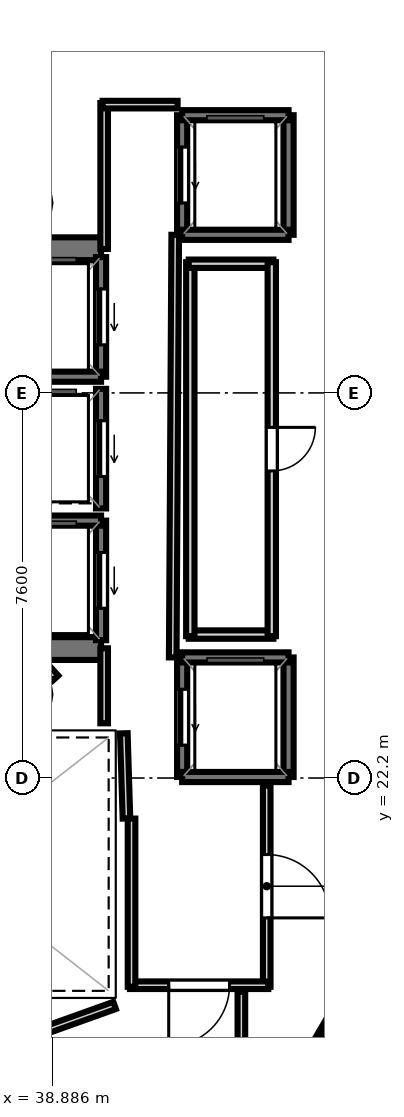
"""IFC4 building model, lengths in metres.
Left out: names, types, materials, properties, quantities, classifications, styles, units other than length and angle.
Written with IfcOpenShell. Run it as: python <this file> out.ifc"""

import sys

from ifc_helpers import new_model, si_unit, direction, frame, frame_2d, origin, place, context, subcontext, project, spatial, rectangle, extrude, element, fill, save


model = new_model("IFC4")
c1 = context("Model", 3, precision=1e-05, world=origin(), true_north=direction((0.0, 1.0)))
c2 = subcontext(c1, "Body", "Model", "MODEL_VIEW")
j1 = project(units=[si_unit("LENGTHUNIT", "METRE"), si_unit("PLANEANGLEUNIT", "RADIAN")], contexts=[c1])
p1 = place(None, origin())
s1 = spatial("IfcSite", under=j1, at=p1, CompositionType="ELEMENT")
p2 = place(p1, origin())
s2 = spatial("IfcBuilding", under=s1, at=p2, CompositionType="ELEMENT")
p3 = place(p2, frame((0.0, 0.0, 299.1)))
s3 = spatial("IfcBuildingStorey", under=s2, at=p3, CompositionType="ELEMENT", Elevation=299.1)
p4 = place(p3, frame((29.33, 32.645, 0.0), z_axis=(0.0, 0.0, 1.0), x_axis=(1.0, 0.0, 0.0)))
e1 = element("IfcWall", 1, at=p4, inside=s3, PredefinedType="SHEAR", context=c2, shape_type="SweptSolid", body=[
    extrude(rectangle(XDim=10.52, YDim=0.45, at=frame_2d((5.26, 0.0))), origin(), (0.0, 0.0, 1.0), 3.52),
])
p5 = place(p4, frame((0.895, 0.0, 0.0)))
e2 = element("IfcOpeningElement", 2, at=p5, cuts=e1, PredefinedType="OPENING", context=c2, shape_type="SweptSolid", body=[
    extrude(rectangle(XDim=1.25, YDim=2.15, at=frame_2d((0.625, 1.075))), frame((0.0, 0.235, 0.0), z_axis=(0.0, -1.0, 0.0), x_axis=(1.0, 0.0, 0.0)), (0.0, 0.0, 1.0), 0.47),
])
p6 = place(p3, frame((29.33, 24.755, 0.0), z_axis=(0.0, 0.0, 1.0), x_axis=(1.0, 0.0, 0.0)))
e3 = element("IfcWall", 3, at=p6, inside=s3, PredefinedType="SHEAR", context=c2, shape_type="SweptSolid", body=[
    extrude(rectangle(XDim=10.52, YDim=0.45, at=frame_2d((5.26, 0.0))), origin(), (0.0, 0.0, 1.0), 3.52),
])
p7 = place(p6, frame((0.695, 0.0, 0.0)))
e4 = element("IfcOpeningElement", 4, at=p7, cuts=e3, PredefinedType="OPENING", context=c2, shape_type="SweptSolid", body=[
    extrude(rectangle(XDim=1.25, YDim=2.15, at=frame_2d((0.625, 1.075))), frame((0.0, 0.235, 0.0), z_axis=(0.0, -1.0, 0.0), x_axis=(1.0, 0.0, 0.0)), (0.0, 0.0, 1.0), 0.47),
])
p8 = place(p3, frame((39.85, 30.12, 0.0), z_axis=(0.0, 0.0, 1.0), x_axis=(0.0, 1.0, 0.0)))
e5 = element("IfcWall", 5, at=p8, inside=s3, PredefinedType="SOLIDWALL", context=c2, shape_type="SweptSolid", body=[
    extrude(rectangle(XDim=2.36, YDim=0.2, at=frame_2d((1.18, 0.0))), origin(), (0.0, 0.0, 1.0), 3.52),
])
p9 = place(p8, frame((0.63, 0.0, 0.0)))
e6 = element("IfcOpeningElement", 6, at=p9, cuts=e5, PredefinedType="OPENING", context=c2, shape_type="SweptSolid", body=[
    extrude(rectangle(XDim=1.1, YDim=2.15, at=frame_2d((0.55, 1.075))), frame((0.0, 0.11, 0.0), z_axis=(0.0, -1.0, 0.0), x_axis=(1.0, 0.0, 0.0)), (0.0, 0.0, 1.0), 0.22),
])
p10 = place(p3, frame((37.75, 30.12, 0.0), z_axis=(0.0, 0.0, 1.0), x_axis=(1.0, 0.0, 0.0)))
e7 = element("IfcWall", 7, at=p10, inside=s3, PredefinedType="SOLIDWALL", context=c2, shape_type="SweptSolid", body=[
    extrude(rectangle(XDim=2.1, YDim=0.2, at=frame_2d((1.05, 0.0))), origin(), (0.0, 0.0, 1.0), 3.52),
])
p11 = place(p3, frame((39.85, 24.92, 0.0), z_axis=(0.0, 0.0, 1.0), x_axis=(0.0, 1.0, 0.0)))
e8 = element("IfcWall", 8, at=p11, inside=s3, PredefinedType="SOLIDWALL", context=c2, shape_type="SweptSolid", body=[
    extrude(rectangle(XDim=2.36, YDim=0.2, at=frame_2d((1.18, 0.0))), origin(), (0.0, 0.0, 1.0), 3.52),
])
p12 = place(p11, frame((0.63, 0.0, 0.0)))
e9 = element("IfcOpeningElement", 9, at=p12, cuts=e8, PredefinedType="OPENING", context=c2, shape_type="SweptSolid", body=[
    extrude(rectangle(XDim=1.1, YDim=2.15, at=frame_2d((0.55, 1.075))), frame((0.0, 0.11, 0.0), z_axis=(0.0, -1.0, 0.0), x_axis=(1.0, 0.0, 0.0)), (0.0, 0.0, 1.0), 0.22),
])
p13 = place(p3, frame((37.75, 27.28, 0.0), z_axis=(0.0, 0.0, 1.0), x_axis=(1.0, 0.0, 0.0)))
e10 = element("IfcWall", 10, at=p13, inside=s3, PredefinedType="SOLIDWALL", context=c2, shape_type="SweptSolid", body=[
    extrude(rectangle(XDim=2.1, YDim=0.2, at=frame_2d((1.05, 0.0))), origin(), (0.0, 0.0, 1.0), 3.52),
])
p14 = place(p3, frame((39.85, 27.52, 0.0), z_axis=(0.0, 0.0, 1.0), x_axis=(0.0, 1.0, 0.0)))
e11 = element("IfcWall", 11, at=p14, inside=s3, PredefinedType="SOLIDWALL", context=c2, shape_type="SweptSolid", body=[
    extrude(rectangle(XDim=2.36, YDim=0.2, at=frame_2d((1.18, 0.0))), origin(), (0.0, 0.0, 1.0), 3.52),
])
p15 = place(p14, frame((0.63, 0.0, 0.0)))
e12 = element("IfcOpeningElement", 12, at=p15, cuts=e11, PredefinedType="OPENING", context=c2, shape_type="SweptSolid", body=[
    extrude(rectangle(XDim=1.1, YDim=2.15, at=frame_2d((0.55, 1.075))), frame((0.0, 0.11, 0.0), z_axis=(0.0, -1.0, 0.0), x_axis=(1.0, 0.0, 0.0)), (0.0, 0.0, 1.0), 0.22),
])
p16 = place(p3, frame((43.55, 22.22, 0.0), z_axis=(0.0, 0.0, 1.0), x_axis=(0.0, 1.0, 0.0)))
e13 = element("IfcWall", 13, at=p16, inside=s3, PredefinedType="SOLIDWALL", context=c2, shape_type="SweptSolid", body=[
    extrude(rectangle(XDim=2.36, YDim=0.2, at=frame_2d((1.18, 0.0))), origin(), (0.0, 0.0, 1.0), 3.52),
])
p17 = place(p3, frame((41.45, 22.22, 0.0), z_axis=(0.0, 0.0, 1.0), x_axis=(0.0, 1.0, 0.0)))
e14 = element("IfcWall", 14, at=p17, inside=s3, PredefinedType="SOLIDWALL", context=c2, shape_type="SweptSolid", body=[
    extrude(rectangle(XDim=2.36, YDim=0.2, at=frame_2d((1.18, 0.0))), origin(), (0.0, 0.0, 1.0), 3.52),
])
p18 = place(p17, frame((0.63, 0.0, 0.0)))
e15 = element("IfcOpeningElement", 15, at=p18, cuts=e14, PredefinedType="OPENING", context=c2, shape_type="SweptSolid", body=[
    extrude(rectangle(XDim=1.1, YDim=2.15, at=frame_2d((0.55, 1.075))), frame((0.0, 0.11, 0.0), z_axis=(0.0, -1.0, 0.0), x_axis=(1.0, 0.0, 0.0)), (0.0, 0.0, 1.0), 0.22),
])
for number, where, z_axis, x_axis in (
    (16, (41.45, 24.58, 0.0), (0.0, 0.0, 1.0), (1.0, 0.0, 0.0)),
    (17, (41.45, 22.22, 0.0), (0.0, 0.0, 1.0), (1.0, 0.0, 0.0)),
):
    element("IfcWall", number, at=place(p3, frame(where, z_axis=z_axis, x_axis=x_axis)), inside=s3, PredefinedType="SOLIDWALL", context=c2, shape_type="SweptSolid", body=[
        extrude(rectangle(XDim=2.1, YDim=0.2, at=frame_2d((1.05, 0.0))), origin(), (0.0, 0.0, 1.0), 3.52),
    ])
p19 = place(p3, frame((43.55, 32.92, 0.0), z_axis=(0.0, 0.0, 1.0), x_axis=(0.0, 1.0, 0.0)))
e18 = element("IfcWall", 18, at=p19, inside=s3, PredefinedType="SOLIDWALL", context=c2, shape_type="SweptSolid", body=[
    extrude(rectangle(XDim=2.36, YDim=0.2, at=frame_2d((1.18, 0.0))), origin(), (0.0, 0.0, 1.0), 3.52),
])
p20 = place(p3, frame((41.45, 32.92, 0.0), z_axis=(0.0, 0.0, 1.0), x_axis=(0.0, 1.0, 0.0)))
e19 = element("IfcWall", 19, at=p20, inside=s3, PredefinedType="SOLIDWALL", context=c2, shape_type="SweptSolid", body=[
    extrude(rectangle(XDim=2.36, YDim=0.2, at=frame_2d((1.18, 0.0))), origin(), (0.0, 0.0, 1.0), 3.52),
])
p21 = place(p20, frame((0.63, 0.0, 0.0)))
e20 = element("IfcOpeningElement", 20, at=p21, cuts=e19, PredefinedType="OPENING", context=c2, shape_type="SweptSolid", body=[
    extrude(rectangle(XDim=1.1, YDim=2.15, at=frame_2d((0.55, 1.075))), frame((0.0, 0.11, 0.0), z_axis=(0.0, -1.0, 0.0), x_axis=(1.0, 0.0, 0.0)), (0.0, 0.0, 1.0), 0.22),
])
for number, where, z_axis, x_axis in (
    (21, (41.45, 35.28, 0.0), (0.0, 0.0, 1.0), (1.0, 0.0, 0.0)),
    (22, (41.45, 32.92, 0.0), (0.0, 0.0, 1.0), (1.0, 0.0, 0.0)),
):
    element("IfcWall", number, at=place(p3, frame(where, z_axis=z_axis, x_axis=x_axis)), inside=s3, PredefinedType="SOLIDWALL", context=c2, shape_type="SweptSolid", body=[
        extrude(rectangle(XDim=2.1, YDim=0.2, at=frame_2d((1.05, 0.0))), origin(), (0.0, 0.0, 1.0), 3.52),
    ])
p22 = place(p3, frame((40.351, 21.401, 0.0), z_axis=(0.0, 0.0, 1.0), x_axis=(-0.031058045979, 0.999517582527, 0.0)))
e23 = element("IfcWall", 23, at=p22, inside=s3, PredefinedType="PARTITIONING", context=c2, shape_type="SweptSolid", body=[
    extrude(rectangle(XDim=1.682, YDim=0.15, at=frame_2d((0.841, 0.0))), origin(), (0.0, 0.0, 1.0), 2.84),
])
p23 = place(p3, frame((39.911, 23.28, 0.0), z_axis=(0.0, 0.0, 1.0), x_axis=(0.0, 1.0, 0.0)))
e24 = element("IfcWall", 24, at=p23, inside=s3, PredefinedType="PARTITIONING", context=c2, shape_type="SweptSolid", body=[
    extrude(rectangle(XDim=1.48, YDim=0.15, at=frame_2d((0.74, 0.0))), origin(), (0.0, 0.0, 1.0), 2.84),
])
p24 = place(p3, frame((39.911, 32.64, 0.0), z_axis=(0.0, 0.0, 1.0), x_axis=(0.0, 1.0, 0.0)))
e25 = element("IfcWall", 25, at=p24, inside=s3, PredefinedType="PARTITIONING", context=c2, shape_type="SweptSolid", body=[
    extrude(rectangle(XDim=2.88, YDim=0.15, at=frame_2d((1.44, 0.0))), origin(), (0.0, 0.0, 1.0), 2.84),
])
p25 = place(p3, frame((39.88, 35.489, 0.0), z_axis=(0.0, 0.0, 1.0), x_axis=(1.0, 0.0, 0.0)))
e26 = element("IfcWall", 26, at=p25, inside=s3, PredefinedType="PARTITIONING", context=c2, shape_type="SweptSolid", body=[
    extrude(rectangle(XDim=1.48, YDim=0.15, at=frame_2d((0.74, 0.0))), origin(), (0.0, 0.0, 1.0), 2.84),
])
p26 = place(p3, frame((41.313, 32.92, 0.0), z_axis=(0.0, 0.0, 1.0), x_axis=(-0.005942518022, -0.999982343084, 0.0)))
e27 = element("IfcWall", 27, at=p26, inside=s3, PredefinedType="PARTITIONING", context=c2, shape_type="SweptSolid", body=[
    extrude(rectangle(XDim=8.34, YDim=0.15, at=frame_2d((4.17, 0.0))), origin(), (0.0, 0.0, 1.0), 2.84),
])
p27 = place(p3, frame((43.119, 22.05, 0.0), z_axis=(0.0, 0.0, 1.0), x_axis=(0.0, -1.0, 0.0)))
e28 = element("IfcWall", 28, at=p27, inside=s3, PredefinedType="PARTITIONING", context=c2, shape_type="SweptSolid", body=[
    extrude(rectangle(XDim=3.97, YDim=0.15, at=frame_2d((1.985, 0.0))), origin(), (0.0, 0.0, 1.0), 2.84),
])
p28 = place(p27, frame((1.36, 0.0, 0.0)))
e29 = element("IfcOpeningElement", 29, at=p28, cuts=e28, PredefinedType="OPENING", context=c2, shape_type="SweptSolid", body=[
    extrude(rectangle(XDim=1.25, YDim=2.2, at=frame_2d((0.625, 1.1))), frame((0.0, 0.085, 0.0), z_axis=(0.0, -1.0, 0.0), x_axis=(1.0, 0.0, 0.0)), (0.0, 0.0, 1.0), 0.17),
])
p29 = place(p3, frame((43.15, 18.111, 0.0), z_axis=(0.0, 0.0, 1.0), x_axis=(-1.0, 0.0, 0.0)))
e30 = element("IfcWall", 30, at=p29, inside=s3, PredefinedType="PARTITIONING", context=c2, shape_type="SweptSolid", body=[
    extrude(rectangle(XDim=2.73, YDim=0.15, at=frame_2d((1.365, 0.0))), origin(), (0.0, 0.0, 1.0), 2.84),
])
p30 = place(p29, frame((0.765, 0.0, 0.0)))
e31 = element("IfcOpeningElement", 31, at=p30, cuts=e30, PredefinedType="OPENING", context=c2, shape_type="SweptSolid", body=[
    extrude(rectangle(XDim=1.2, YDim=2.15, at=frame_2d((0.6, 1.075))), frame((0.0, 0.085, 0.0), z_axis=(0.0, -1.0, 0.0), x_axis=(1.0, 0.0, 0.0)), (0.0, 0.0, 1.0), 0.17),
])
p31 = place(p3, frame((40.451, 18.08, 0.0), z_axis=(0.0, 0.0, 1.0), x_axis=(0.0, 1.0, 0.0)))
e32 = element("IfcWall", 32, at=p31, inside=s3, PredefinedType="PARTITIONING", context=c2, shape_type="SweptSolid", body=[
    extrude(rectangle(XDim=3.32, YDim=0.15, at=frame_2d((1.66, 0.0))), origin(), (0.0, 0.0, 1.0), 2.84),
])
p32 = place(p3, frame((43.25, 25.031, 0.0), z_axis=(0.0, 0.0, 1.0), x_axis=(-1.0, 0.0, 0.0)))
e33 = element("IfcWall", 33, at=p32, inside=s3, PredefinedType="PLUMBINGWALL", context=c2, shape_type="SweptSolid", body=[
    extrude(rectangle(XDim=1.67, YDim=0.165, at=frame_2d((0.835, 0.0))), origin(), (0.0, 0.0, 1.0), 2.84),
])
p33 = place(p3, frame((41.611, 25.0, 0.0), z_axis=(0.0, 0.0, 1.0), x_axis=(0.0, 1.0, 0.0)))
e34 = element("IfcWall", 34, at=p33, inside=s3, PredefinedType="PLUMBINGWALL", context=c2, shape_type="SweptSolid", body=[
    extrude(rectangle(XDim=7.38, YDim=0.165, at=frame_2d((3.69, 0.0))), origin(), (0.0, 0.0, 1.0), 2.84),
])
p34 = place(p3, frame((41.58, 32.349, 0.0), z_axis=(0.0, 0.0, 1.0), x_axis=(1.0, 0.0, 0.0)))
e35 = element("IfcWall", 35, at=p34, inside=s3, PredefinedType="PLUMBINGWALL", context=c2, shape_type="SweptSolid", body=[
    extrude(rectangle(XDim=1.67, YDim=0.165, at=frame_2d((0.835, 0.0))), origin(), (0.0, 0.0, 1.0), 2.84),
])
p35 = place(p3, frame((43.219, 32.38, 0.0), z_axis=(0.0, 0.0, 1.0), x_axis=(0.0, -1.0, 0.0)))
e36 = element("IfcWall", 36, at=p35, inside=s3, PredefinedType="PLUMBINGWALL", context=c2, shape_type="SweptSolid", body=[
    extrude(rectangle(XDim=7.38, YDim=0.165, at=frame_2d((3.69, 0.0))), origin(), (0.0, 0.0, 1.0), 2.84),
])
p36 = place(p35, frame((3.26, 0.0, 0.0)))
e37 = element("IfcOpeningElement", 37, at=p36, cuts=e36, PredefinedType="OPENING", context=c2, shape_type="SweptSolid", body=[
    extrude(rectangle(XDim=0.86, YDim=2.05, at=frame_2d((0.43, 1.025))), frame((0.0, 0.093, 0.0), z_axis=(0.0, -1.0, 0.0), x_axis=(1.0, 0.0, 0.0)), (0.0, 0.0, 1.0), 0.185),
])
p37 = place(p3, frame((38.951, 24.171, 0.0), z_axis=(0.0, 0.0, 1.0), x_axis=(-0.674186852077, 0.738560822469, 0.0)))
e38 = element("IfcWall", 38, at=p37, inside=s3, PredefinedType="PARTITIONING", context=c2, shape_type="SweptSolid", body=[
    extrude(rectangle(XDim=0.281, YDim=0.15, at=frame_2d((0.14, 0.0))), origin(), (0.0, 0.0, 1.0), 2.84),
])
p38 = place(p3, frame((36.81, 16.529, 0.0), z_axis=(0.0, 0.0, 1.0), x_axis=(0.941548344365, 0.33687789364, 0.0)))
e39 = element("IfcWall", 39, at=p38, inside=s3, PredefinedType="PARTITIONING", context=c2, shape_type="SweptSolid", body=[
    extrude(rectangle(XDim=3.513, YDim=0.15, at=frame_2d((1.756, 0.0))), origin(), (0.0, 0.0, 1.0), 2.84),
])
p39 = place(p3, frame((42.619, 17.98, 0.0), z_axis=(0.0, 0.0, 1.0), x_axis=(0.0, -1.0, 0.0)))
e40 = element("IfcWall", 40, at=p39, inside=s3, PredefinedType="PARTITIONING", context=c2, shape_type="SweptSolid", body=[
    extrude(rectangle(XDim=1.93, YDim=0.15, at=frame_2d((0.965, 0.0))), origin(), (0.0, 0.0, 1.0), 2.84),
])
p40 = place(p3, frame((55.938, 37.275, 0.0), z_axis=(0.0, 0.0, 1.0), x_axis=(-0.504337097155, -0.863506857201, 0.0)))
e41 = element("IfcWall", 41, at=p40, inside=s3, PredefinedType="PARTITIONING", context=c2, shape_type="SweptSolid", body=[
    extrude(rectangle(XDim=35.169, YDim=0.105, at=frame_2d((17.585, 0.0))), origin(), (0.0, 0.0, 1.0), 2.84),
])
p41 = place(p9, origin())
e42 = element("IfcDoor", 42, at=p41, inside=s3, OperationType="SLIDING_TO_LEFT", PredefinedType="DOOR", context=c2, shape_type="SweptSolid", body=[
    extrude(rectangle(XDim=1.1, YDim=2.15, at=frame_2d((0.55, 1.075))), frame((0.0, 0.025, 0.0), z_axis=(0.0, -1.0, 0.0), x_axis=(1.0, 0.0, 0.0)), (0.0, 0.0, 1.0), 0.05),
])
fill(e6, e42)
p42 = place(p12, origin())
e43 = element("IfcDoor", 43, at=p42, inside=s3, OperationType="SLIDING_TO_LEFT", PredefinedType="DOOR", context=c2, shape_type="SweptSolid", body=[
    extrude(rectangle(XDim=1.1, YDim=2.15, at=frame_2d((0.55, 1.075))), frame((0.0, 0.025, 0.0), z_axis=(0.0, -1.0, 0.0), x_axis=(1.0, 0.0, 0.0)), (0.0, 0.0, 1.0), 0.05),
])
fill(e9, e43)
p43 = place(p15, origin())
e44 = element("IfcDoor", 44, at=p43, inside=s3, OperationType="SLIDING_TO_LEFT", PredefinedType="DOOR", context=c2, shape_type="SweptSolid", body=[
    extrude(rectangle(XDim=1.1, YDim=2.15, at=frame_2d((0.55, 1.075))), frame((0.0, 0.025, 0.0), z_axis=(0.0, -1.0, 0.0), x_axis=(1.0, 0.0, 0.0)), (0.0, 0.0, 1.0), 0.05),
])
fill(e12, e44)
p44 = place(p18, origin())
e45 = element("IfcDoor", 45, at=p44, inside=s3, OperationType="SLIDING_TO_LEFT", PredefinedType="DOOR", context=c2, shape_type="SweptSolid", body=[
    extrude(rectangle(XDim=1.1, YDim=2.15, at=frame_2d((0.55, 1.075))), frame((0.0, 0.025, 0.0), z_axis=(0.0, -1.0, 0.0), x_axis=(1.0, 0.0, 0.0)), (0.0, 0.0, 1.0), 0.05),
])
fill(e15, e45)
p45 = place(p21, origin())
e46 = element("IfcDoor", 46, at=p45, inside=s3, OperationType="SLIDING_TO_LEFT", PredefinedType="DOOR", context=c2, shape_type="SweptSolid", body=[
    extrude(rectangle(XDim=1.1, YDim=2.15, at=frame_2d((0.55, 1.075))), frame((0.0, 0.025, 0.0), z_axis=(0.0, -1.0, 0.0), x_axis=(1.0, 0.0, 0.0)), (0.0, 0.0, 1.0), 0.05),
])
fill(e20, e46)
p46 = place(p30, origin())
e47 = element("IfcDoor", 47, at=p46, inside=s3, OperationType="SINGLE_SWING_RIGHT", PredefinedType="DOOR", context=c2, shape_type="SweptSolid", body=[
    extrude(rectangle(XDim=1.2, YDim=2.15, at=frame_2d((0.6, 1.075))), frame((0.0, 0.025, 0.0), z_axis=(0.0, -1.0, 0.0), x_axis=(1.0, 0.0, 0.0)), (0.0, 0.0, 1.0), 0.05),
])
fill(e31, e47)
p47 = place(p28, origin())
e48 = element("IfcDoor", 48, at=p47, inside=s3, OperationType="SINGLE_SWING_RIGHT", PredefinedType="DOOR", context=c2, shape_type="SweptSolid", body=[
    extrude(rectangle(XDim=1.25, YDim=2.2, at=frame_2d((0.625, 1.1))), frame((0.0, 0.025, 0.0), z_axis=(0.0, -1.0, 0.0), x_axis=(1.0, 0.0, 0.0)), (0.0, 0.0, 1.0), 0.05),
])
fill(e29, e48)
p48 = place(p36, origin())
e49 = element("IfcDoor", 49, at=p48, inside=s3, OperationType="SINGLE_SWING_LEFT", PredefinedType="DOOR", context=c2, shape_type="SweptSolid", body=[
    extrude(rectangle(XDim=0.86, YDim=2.05, at=frame_2d((0.43, 1.025))), frame((0.0, 0.025, 0.0), z_axis=(0.0, -1.0, 0.0), x_axis=(1.0, 0.0, 0.0)), (0.0, 0.0, 1.0), 0.05),
])
fill(e37, e49)
save(model, sys.argv[1])
